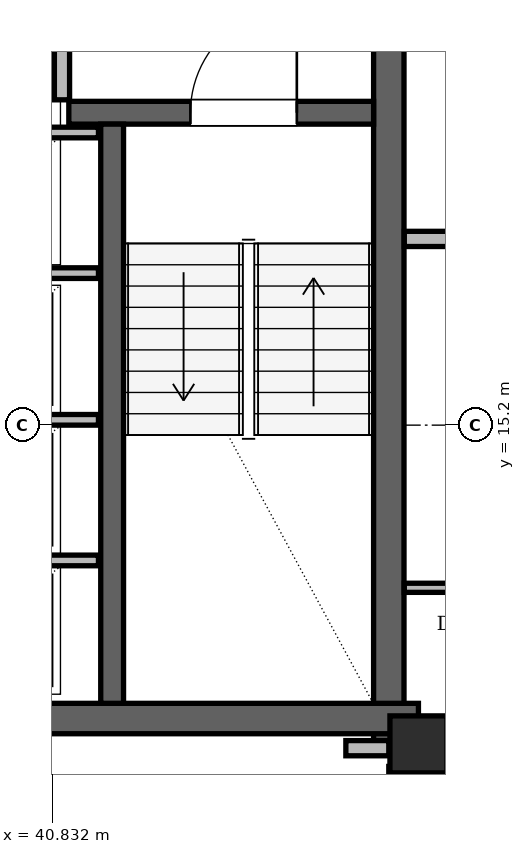
"""IFC4 building model, lengths in metres.
Left out: names, types, materials, properties, quantities, classifications, styles, units other than length and angle.
Written with IfcOpenShell. Run it as: python <this file> out.ifc"""

import sys

from ifc_helpers import new_model, si_unit, direction, frame, frame_2d, origin, origin_2d, place, context, subcontext, project, spatial, rectangle, hollow_rectangle, extrude, element, fill, save


model = new_model("IFC4")
c1 = context("Model", 3, precision=1e-05, world=origin(), true_north=direction((0.0, 1.0)))
c2 = subcontext(c1, "Body", "Model", "MODEL_VIEW")
j1 = project(units=[si_unit("LENGTHUNIT", "METRE"), si_unit("PLANEANGLEUNIT", "RADIAN")], contexts=[c1])
p1 = place(None, origin())
s1 = spatial("IfcSite", under=j1, at=p1, CompositionType="ELEMENT")
p2 = place(p1, origin())
s2 = spatial("IfcBuilding", under=s1, at=p2, CompositionType="ELEMENT")
p3 = place(p2, frame((0.0, 0.0, 167.4)))
s3 = spatial("IfcBuildingStorey", under=s2, at=p3, CompositionType="ELEMENT", Elevation=167.4)
p4 = place(p3, frame((45.65, 11.0, 0.0), z_axis=(0.0, 0.0, 1.0), x_axis=(1.0, 0.0, 0.0)))
e1 = element("IfcColumn", 1, at=p4, inside=s3, PredefinedType="COLUMN", context=c2, shape_type="SweptSolid", body=[
    extrude(hollow_rectangle(XDim=0.75, YDim=0.75, WallThickness=0.06, at=origin_2d()), origin(), (0.0, 0.0, 1.0), 3.6),
])
p5 = place(p3, frame((45.26, 11.0, 0.0), z_axis=(0.0, 0.0, 1.0), x_axis=(0.0, 1.0, 0.0)))
e2 = element("IfcWall", 2, at=p5, inside=s3, PredefinedType="SHEAR", context=c2, shape_type="SweptSolid", body=[
    extrude(rectangle(XDim=13.3, YDim=0.4, at=frame_2d((6.65, 0.0))), origin(), (0.0, 0.0, 1.0), 3.38),
])
p6 = place(p3, frame((38.55, 11.34, 0.0), z_axis=(0.0, 0.0, 1.0), x_axis=(1.0, 0.0, 0.0)))
e3 = element("IfcWall", 3, at=p6, inside=s3, PredefinedType="SHEAR", context=c2, shape_type="SweptSolid", body=[
    extrude(rectangle(XDim=7.1, YDim=0.4, at=frame_2d((3.55, 0.0))), origin(), (0.0, 0.0, 1.0), 3.38),
])
p7 = place(p3, frame((41.05, 19.31, 0.0), z_axis=(0.0, 0.0, 1.0), x_axis=(1.0, 0.0, 0.0)))
e4 = element("IfcWall", 4, at=p7, inside=s3, PredefinedType="SHEAR", context=c2, shape_type="SweptSolid", body=[
    extrude(rectangle(XDim=4.01, YDim=0.3, at=frame_2d((2.005, 0.0))), origin(), (0.0, 0.0, 1.0), 3.38),
])
p8 = place(p7, frame((1.6, 0.0, 0.0)))
e5 = element("IfcOpeningElement", 5, at=p8, cuts=e4, PredefinedType="OPENING", context=c2, shape_type="SweptSolid", body=[
    extrude(rectangle(XDim=1.4, YDim=2.2, at=frame_2d((0.7, 1.1))), frame((0.0, 0.15, 0.0), z_axis=(0.0, -1.0, 0.0), x_axis=(1.0, 0.0, 0.0)), (0.0, 0.0, 1.0), 0.3),
])
p9 = place(p3, frame((41.62, 11.54, 0.0), z_axis=(0.0, 0.0, 1.0), x_axis=(0.0, 1.0, 0.0)))
e6 = element("IfcWall", 6, at=p9, inside=s3, PredefinedType="SHEAR", context=c2, shape_type="SweptSolid", body=[
    extrude(rectangle(XDim=7.62, YDim=0.3, at=frame_2d((3.81, 0.0))), origin(), (0.0, 0.0, 1.0), 3.38),
])
p10 = place(p3, frame((59.756, 12.279, 0.0), z_axis=(0.0, 0.0, 1.0), x_axis=(-0.499997523705, 0.86602683347, 0.0)))
e7 = element("IfcWall", 7, at=p10, inside=s3, PredefinedType="SOLIDWALL", context=c2, shape_type="SweptSolid", body=[
    extrude(rectangle(XDim=35.802, YDim=0.29, at=frame_2d((17.901, 0.0))), origin(), (0.0, 0.0, 1.0), 2.6),
])
p11 = place(p10, frame((6.579, 0.0, 0.0)))
e8 = element("IfcOpeningElement", 8, at=p11, cuts=e7, PredefinedType="OPENING", context=c2, shape_type="SweptSolid", body=[
    extrude(rectangle(XDim=1.5, YDim=2.2, at=frame_2d((0.75, 1.1))), frame((0.0, 0.145, 0.0), z_axis=(0.0, -1.0, 0.0), x_axis=(1.0, 0.0, 0.0)), (0.0, 0.0, 1.0), 0.29),
])
p12 = place(p10, frame((26.158, 0.0, 0.0)))
e9 = element("IfcOpeningElement", 9, at=p12, cuts=e7, PredefinedType="OPENING", context=c2, shape_type="SweptSolid", body=[
    extrude(rectangle(XDim=1.3, YDim=2.2, at=frame_2d((0.65, 1.1))), frame((0.0, 0.145, 0.0), z_axis=(0.0, -1.0, 0.0), x_axis=(1.0, 0.0, 0.0)), (0.0, 0.0, 1.0), 0.29),
])
p13 = place(p10, frame((1.25, 0.0, 0.85)))
e10 = element("IfcOpeningElement", 10, at=p13, cuts=e7, PredefinedType="OPENING", context=c2, shape_type="SweptSolid", body=[
    extrude(rectangle(XDim=1.2, YDim=1.48, at=frame_2d((0.6, 0.74))), frame((0.0, 0.145, 0.0), z_axis=(0.0, -1.0, 0.0), x_axis=(1.0, 0.0, 0.0)), (0.0, 0.0, 1.0), 0.29),
])
p14 = place(p10, frame((17.033, 0.0, 0.85)))
e11 = element("IfcOpeningElement", 11, at=p14, cuts=e7, PredefinedType="OPENING", context=c2, shape_type="SweptSolid", body=[
    extrude(rectangle(XDim=2.6, YDim=1.64, at=frame_2d((1.3, 0.82))), frame((0.0, 0.145, 0.0), z_axis=(0.0, -1.0, 0.0), x_axis=(1.0, 0.0, 0.0)), (0.0, 0.0, 1.0), 0.29),
])
p15 = place(p10, frame((21.982, 0.0, 0.85)))
e12 = element("IfcOpeningElement", 12, at=p15, cuts=e7, PredefinedType="OPENING", context=c2, shape_type="SweptSolid", body=[
    extrude(rectangle(XDim=2.0, YDim=1.64, at=frame_2d((1.0, 0.82))), frame((0.0, 0.145, 0.0), z_axis=(0.0, -1.0, 0.0), x_axis=(1.0, 0.0, 0.0)), (0.0, 0.0, 1.0), 0.29),
])
p16 = place(p10, frame((13.347, 0.0, 0.85)))
e13 = element("IfcOpeningElement", 13, at=p16, cuts=e7, PredefinedType="OPENING", context=c2, shape_type="SweptSolid", body=[
    extrude(rectangle(XDim=1.6, YDim=1.64, at=frame_2d((0.8, 0.82))), frame((0.0, 0.145, 0.0), z_axis=(0.0, -1.0, 0.0), x_axis=(1.0, 0.0, 0.0)), (0.0, 0.0, 1.0), 0.29),
])
p17 = place(p10, frame((31.619, 0.0, 0.85)))
e14 = element("IfcOpeningElement", 14, at=p17, cuts=e7, PredefinedType="OPENING", context=c2, shape_type="SweptSolid", body=[
    extrude(rectangle(XDim=2.6, YDim=1.64, at=frame_2d((1.3, 0.82))), frame((0.0, 0.145, 0.0), z_axis=(0.0, -1.0, 0.0), x_axis=(1.0, 0.0, 0.0)), (0.0, 0.0, 1.0), 0.29),
])
p18 = place(p3, frame((40.96, 19.48, 0.0), z_axis=(0.0, 0.0, 1.0), x_axis=(0.0, 1.0, 0.0)))
e15 = element("IfcWall", 15, at=p18, inside=s3, PredefinedType="PARTITIONING", context=c2, shape_type="SweptSolid", body=[
    extrude(rectangle(XDim=4.5, YDim=0.2, at=frame_2d((2.25, 0.0))), origin(), (0.0, 0.0, 1.0), 3.38),
])
p19 = place(p18, frame((2.12, 0.0, 0.0)))
e16 = element("IfcOpeningElement", 16, at=p19, cuts=e15, PredefinedType="OPENING", context=c2, shape_type="SweptSolid", body=[
    extrude(rectangle(XDim=1.1, YDim=2.2, at=frame_2d((0.55, 1.1))), frame((0.0, 0.1, 0.0), z_axis=(0.0, -1.0, 0.0), x_axis=(1.0, 0.0, 0.0)), (0.0, 0.0, 1.0), 0.2),
])
for number, where, z_axis, x_axis in (
    (17, (38.78, 13.42, 0.0), (0.0, 0.0, 1.0), (1.0, 0.0, 0.0)),
    (18, (38.78, 15.27, 0.0), (0.0, 0.0, 1.0), (1.0, 0.0, 0.0)),
    (19, (38.78, 17.2, 0.0), (0.0, 0.0, 1.0), (1.0, 0.0, 0.0)),
    (20, (38.78, 19.05, 0.0), (0.0, 0.0, 1.0), (1.0, 0.0, 0.0)),
):
    element("IfcWall", number, at=place(p3, frame(where, z_axis=z_axis, x_axis=x_axis)), inside=s3, PredefinedType="PARTITIONING", context=c2, shape_type="SweptSolid", body=[
        extrude(rectangle(XDim=2.66, YDim=0.14, at=frame_2d((1.33, 0.0))), origin(), (0.0, 0.0, 1.0), 3.38),
    ])
p20 = place(p3, frame((45.26, 10.61, 0.0), z_axis=(0.0, 0.0, 1.0), x_axis=(1.0, 0.0, 0.0)))
e21 = element("IfcWall", 21, at=p20, inside=s3, PredefinedType="PARTITIONING", context=c2, shape_type="SweptSolid", body=[
    extrude(rectangle(XDim=0.78, YDim=0.2, at=frame_2d((0.39, 0.0))), origin(), (0.0, 0.0, 1.0), 3.38),
])
p21 = place(p3, frame((44.695, 10.95, 0.0), z_axis=(0.0, 0.0, 1.0), x_axis=(1.0, 0.0, 0.0)))
e22 = element("IfcWall", 22, at=p21, inside=s3, PredefinedType="PARTITIONING", context=c2, shape_type="SweptSolid", body=[
    extrude(rectangle(XDim=0.565, YDim=0.2, at=frame_2d((0.282, 0.0))), origin(), (0.0, 0.0, 1.0), 2.52),
])
p22 = place(p3, frame((45.464, 13.06, 0.0), z_axis=(0.0, 0.0, 1.0), x_axis=(1.0, 0.0, 0.0)))
e23 = element("IfcWall", 23, at=p22, inside=s3, PredefinedType="PARTITIONING", context=c2, shape_type="SweptSolid", body=[
    extrude(rectangle(XDim=13.668, YDim=0.12, at=frame_2d((6.834, 0.0))), origin(), (0.0, 0.0, 1.0), 2.52),
])
p23 = place(p22, frame((0.586, 0.0, 0.0)))
e24 = element("IfcOpeningElement", 24, at=p23, cuts=e23, PredefinedType="OPENING", context=c2, shape_type="SweptSolid", body=[
    extrude(rectangle(XDim=0.88, YDim=2.08, at=frame_2d((0.44, 1.04))), frame((0.0, 0.06, 0.0), z_axis=(0.0, -1.0, 0.0), x_axis=(1.0, 0.0, 0.0)), (0.0, 0.0, 1.0), 0.12),
])
p24 = place(p22, frame((2.536, 0.0, 0.0)))
e25 = element("IfcOpeningElement", 25, at=p24, cuts=e23, PredefinedType="OPENING", context=c2, shape_type="SweptSolid", body=[
    extrude(rectangle(XDim=0.95, YDim=2.1, at=frame_2d((0.475, 1.05))), frame((0.0, 0.06, 0.0), z_axis=(0.0, -1.0, 0.0), x_axis=(1.0, 0.0, 0.0)), (0.0, 0.0, 1.0), 0.12),
])
p25 = place(p22, frame((8.408, 0.0, 0.0)))
e26 = element("IfcOpeningElement", 26, at=p25, cuts=e23, PredefinedType="OPENING", context=c2, shape_type="SweptSolid", body=[
    extrude(rectangle(XDim=0.92, YDim=2.12, at=frame_2d((0.46, 1.06))), frame((0.0, 0.06, 0.0), z_axis=(0.0, -1.0, 0.0), x_axis=(1.0, 0.0, 0.0)), (0.0, 0.0, 1.0), 0.12),
])
p26 = place(p3, frame((45.464, 17.65, 0.0), z_axis=(0.0, 0.0, 1.0), x_axis=(1.0, 0.0, 0.0)))
e27 = element("IfcWall", 27, at=p26, inside=s3, PredefinedType="PARTITIONING", context=c2, shape_type="SweptSolid", body=[
    extrude(rectangle(XDim=11.018, YDim=0.2, at=frame_2d((5.509, 0.0))), origin(), (0.0, 0.0, 1.0), 2.52),
])
p27 = place(p8, origin())
e28 = element("IfcDoor", 28, at=p27, inside=s3, OperationType="SINGLE_SWING_RIGHT", PredefinedType="DOOR", context=c2, shape_type="SweptSolid", body=[
    extrude(rectangle(XDim=1.4, YDim=2.2, at=frame_2d((0.7, 1.1))), frame((0.0, 0.025, 0.0), z_axis=(0.0, -1.0, 0.0), x_axis=(1.0, 0.0, 0.0)), (0.0, 0.0, 1.0), 0.05),
])
fill(e5, e28)
save(model, sys.argv[1])
